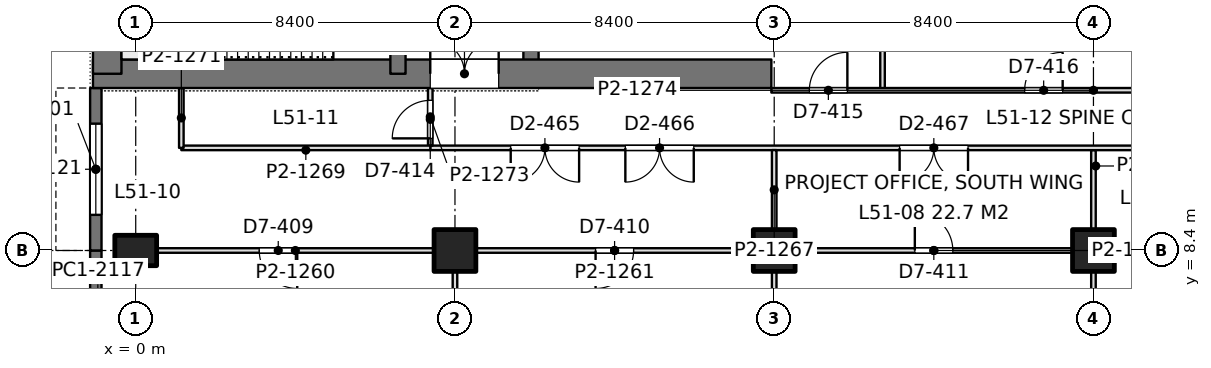
"""IFC4 building model, lengths in metres.
Left out: names, types, materials, properties, quantities, classifications, styles, units other than length and angle.
Written with IfcOpenShell. Run it as: python <this file> out.ifc"""

import sys

from ifc_helpers import new_model, si_unit, direction, frame, frame_2d, origin, origin_2d, place, context, subcontext, project, spatial, rectangle, extrude, element, fill, save


model = new_model("IFC4")
c1 = context("Model", 3, precision=1e-05, world=origin(), true_north=direction((0.0, 1.0)))
c2 = subcontext(c1, "Body", "Model", "MODEL_VIEW")
j1 = project(units=[si_unit("LENGTHUNIT", "METRE"), si_unit("PLANEANGLEUNIT", "RADIAN")], contexts=[c1])
p1 = place(None, origin())
s1 = spatial("IfcSite", under=j1, at=p1, CompositionType="ELEMENT")
p2 = place(p1, origin())
s2 = spatial("IfcBuilding", under=s1, at=p2, CompositionType="ELEMENT")
p3 = place(p2, frame((0.0, 0.0, 223.8)))
s3 = spatial("IfcBuildingStorey", under=s2, at=p3, CompositionType="ELEMENT", Elevation=223.8)
p4 = place(p3, frame((0.0, 8.4, 0.0), z_axis=(0.0, 0.0, 1.0), x_axis=(0.0, 1.0, 0.0)))
e1 = element("IfcColumn", 1, at=p4, inside=s3, PredefinedType="COLUMN", context=c2, shape_type="SweptSolid", body=[
    extrude(rectangle(XDim=0.8, YDim=1.1, at=origin_2d()), origin(), (0.0, 0.0, 1.0), 4.2),
])
for number, where, z_axis, x_axis in (
    (2, (8.4, 8.4, 0.0), (0.0, 0.0, 1.0), (1.0, 0.0, 0.0)),
    (3, (16.8, 8.4, 0.0), (0.0, 0.0, 1.0), (1.0, 0.0, 0.0)),
    (4, (25.2, 8.4, 0.0), (0.0, 0.0, 1.0), (1.0, 0.0, 0.0)),
):
    element("IfcColumn", number, at=place(p3, frame(where, z_axis=z_axis, x_axis=x_axis)), inside=s3, PredefinedType="COLUMN", context=c2, shape_type="SweptSolid", body=[
        extrude(rectangle(XDim=1.1, YDim=1.1, at=origin_2d()), origin(), (0.0, 0.0, 1.0), 4.2),
    ])
p5 = place(p3, frame((-1.125, 13.05, 0.0), z_axis=(0.0, 0.0, 1.0), x_axis=(1.0, 0.0, 0.0)))
e5 = element("IfcWall", 5, at=p5, inside=s3, PredefinedType="SHEAR", context=c2, shape_type="SweptSolid", body=[
    extrude(rectangle(XDim=17.85, YDim=0.75, at=frame_2d((8.925, 0.0))), origin(), (0.0, 0.0, 1.0), 4.2),
])
p6 = place(p5, frame((8.875, 0.0, 0.0)))
e6 = element("IfcOpeningElement", 6, at=p6, cuts=e5, PredefinedType="OPENING", context=c2, shape_type="SweptSolid", body=[
    extrude(rectangle(XDim=1.8, YDim=2.4, at=frame_2d((0.9, 1.2))), frame((0.0, 0.385, 0.0), z_axis=(0.0, -1.0, 0.0), x_axis=(1.0, 0.0, 0.0)), (0.0, 0.0, 1.0), 0.77),
])
p7 = place(p3, frame((-0.75, 13.05, 0.0), z_axis=(0.0, 0.0, 1.0), x_axis=(0.0, 1.0, 0.0)))
e7 = element("IfcWall", 7, at=p7, inside=s3, PredefinedType="SHEAR", context=c2, shape_type="SweptSolid", body=[
    extrude(rectangle(XDim=24.3, YDim=0.75, at=frame_2d((12.15, 0.0))), origin(), (0.0, 0.0, 1.0), 4.2),
])
p8 = place(p3, frame((6.9, 13.05, 0.0), z_axis=(0.0, 0.0, 1.0), x_axis=(0.0, 1.0, 0.0)))
e8 = element("IfcWall", 8, at=p8, inside=s3, PredefinedType="SHEAR", context=c2, shape_type="SweptSolid", body=[
    extrude(rectangle(XDim=24.3, YDim=0.4, at=frame_2d((12.15, 0.0))), origin(), (0.0, 0.0, 1.0), 4.2),
])
p9 = place(p8, frame((1.3, 0.0, 0.0)))
e9 = element("IfcOpeningElement", 9, at=p9, cuts=e8, PredefinedType="OPENING", context=c2, shape_type="SweptSolid", body=[
    extrude(rectangle(XDim=1.0, YDim=2.2, at=frame_2d((0.5, 1.1))), frame((0.0, 0.21, 0.0), z_axis=(0.0, -1.0, 0.0), x_axis=(1.0, 0.0, 0.0)), (0.0, 0.0, 1.0), 0.42),
])
p10 = place(p8, frame((22.0, 0.0, 0.0)))
e10 = element("IfcOpeningElement", 10, at=p10, cuts=e8, PredefinedType="OPENING", context=c2, shape_type="SweptSolid", body=[
    extrude(rectangle(XDim=1.0, YDim=2.2, at=frame_2d((0.5, 1.1))), frame((0.0, 0.21, 0.0), z_axis=(0.0, -1.0, 0.0), x_axis=(1.0, 0.0, 0.0)), (0.0, 0.0, 1.0), 0.42),
])
p11 = place(p8, frame((5.55, 0.0, 0.0)))
e11 = element("IfcOpeningElement", 11, at=p11, cuts=e8, PredefinedType="OPENING", context=c2, shape_type="SweptSolid", body=[
    extrude(rectangle(XDim=1.0, YDim=2.2, at=frame_2d((0.5, 1.1))), frame((0.0, 0.21, 0.0), z_axis=(0.0, -1.0, 0.0), x_axis=(1.0, 0.0, 0.0)), (0.0, 0.0, 1.0), 0.42),
])
p12 = place(p8, frame((9.55, 0.0, 0.0)))
e12 = element("IfcOpeningElement", 12, at=p12, cuts=e8, PredefinedType="OPENING", context=c2, shape_type="SweptSolid", body=[
    extrude(rectangle(XDim=1.0, YDim=2.2, at=frame_2d((0.5, 1.1))), frame((0.0, 0.21, 0.0), z_axis=(0.0, -1.0, 0.0), x_axis=(1.0, 0.0, 0.0)), (0.0, 0.0, 1.0), 0.42),
])
p13 = place(p8, frame((12.8, 0.0, 0.0)))
e13 = element("IfcOpeningElement", 13, at=p13, cuts=e8, PredefinedType="OPENING", context=c2, shape_type="SweptSolid", body=[
    extrude(rectangle(XDim=1.1, YDim=2.2, at=frame_2d((0.55, 1.1))), frame((0.0, 0.21, 0.0), z_axis=(0.0, -1.0, 0.0), x_axis=(1.0, 0.0, 0.0)), (0.0, 0.0, 1.0), 0.42),
])
p14 = place(p8, frame((15.538, 0.0, 0.0)))
e14 = element("IfcOpeningElement", 14, at=p14, cuts=e8, PredefinedType="OPENING", context=c2, shape_type="SweptSolid", body=[
    extrude(rectangle(XDim=1.1, YDim=2.2, at=frame_2d((0.55, 1.1))), frame((0.0, 0.21, 0.0), z_axis=(0.0, -1.0, 0.0), x_axis=(1.0, 0.0, 0.0)), (0.0, 0.0, 1.0), 0.42),
])
p15 = place(p8, frame((18.262, 0.0, 0.0)))
e15 = element("IfcOpeningElement", 15, at=p15, cuts=e8, PredefinedType="OPENING", context=c2, shape_type="SweptSolid", body=[
    extrude(rectangle(XDim=1.1, YDim=2.2, at=frame_2d((0.55, 1.1))), frame((0.0, 0.21, 0.0), z_axis=(0.0, -1.0, 0.0), x_axis=(1.0, 0.0, 0.0)), (0.0, 0.0, 1.0), 0.42),
])
p16 = place(p3, frame((10.4, 13.05, 0.0), z_axis=(0.0, 0.0, 1.0), x_axis=(0.0, 1.0, 0.0)))
e16 = element("IfcWall", 16, at=p16, inside=s3, PredefinedType="SHEAR", context=c2, shape_type="SweptSolid", body=[
    extrude(rectangle(XDim=24.3, YDim=0.4, at=frame_2d((12.15, 0.0))), origin(), (0.0, 0.0, 1.0), 4.2),
])
p17 = place(p16, frame((15.75, 0.0, 0.0)))
e17 = element("IfcOpeningElement", 17, at=p17, cuts=e16, PredefinedType="OPENING", context=c2, shape_type="SweptSolid", body=[
    extrude(rectangle(XDim=1.1, YDim=2.2, at=frame_2d((0.55, 1.1))), frame((0.0, 0.21, 0.0), z_axis=(0.0, -1.0, 0.0), x_axis=(1.0, 0.0, 0.0)), (0.0, 0.0, 1.0), 0.42),
])
p18 = place(p16, frame((18.6, 0.0, 0.0)))
e18 = element("IfcOpeningElement", 18, at=p18, cuts=e16, PredefinedType="OPENING", context=c2, shape_type="SweptSolid", body=[
    extrude(rectangle(XDim=1.1, YDim=2.2, at=frame_2d((0.55, 1.1))), frame((0.0, 0.21, 0.0), z_axis=(0.0, -1.0, 0.0), x_axis=(1.0, 0.0, 0.0)), (0.0, 0.0, 1.0), 0.42),
])
p19 = place(p16, frame((21.45, 0.0, 0.0)))
e19 = element("IfcOpeningElement", 19, at=p19, cuts=e16, PredefinedType="OPENING", context=c2, shape_type="SweptSolid", body=[
    extrude(rectangle(XDim=1.1, YDim=2.2, at=frame_2d((0.55, 1.1))), frame((0.0, 0.21, 0.0), z_axis=(0.0, -1.0, 0.0), x_axis=(1.0, 0.0, 0.0)), (0.0, 0.0, 1.0), 0.42),
])
p20 = place(p16, frame((6.05, 0.0, 0.0)))
e20 = element("IfcOpeningElement", 20, at=p20, cuts=e16, PredefinedType="OPENING", context=c2, shape_type="SweptSolid", body=[
    extrude(rectangle(XDim=1.8, YDim=2.4, at=frame_2d((0.9, 1.2))), frame((0.0, 0.21, 0.0), z_axis=(0.0, -1.0, 0.0), x_axis=(1.0, 0.0, 0.0)), (0.0, 0.0, 1.0), 0.42),
])
p21 = place(p16, frame((11.25, 0.0, 0.0)))
e21 = element("IfcOpeningElement", 21, at=p21, cuts=e16, PredefinedType="OPENING", context=c2, shape_type="SweptSolid", body=[
    extrude(rectangle(XDim=1.8, YDim=2.4, at=frame_2d((0.9, 1.2))), frame((0.0, 0.21, 0.0), z_axis=(0.0, -1.0, 0.0), x_axis=(1.0, 0.0, 0.0)), (0.0, 0.0, 1.0), 0.42),
])
p22 = place(p3, frame((-1.05, 5.915, 0.0), z_axis=(0.0, 0.0, 1.0), x_axis=(0.0, 1.0, 0.0)))
e22 = element("IfcWall", 22, at=p22, inside=s3, PredefinedType="SOLIDWALL", context=c2, shape_type="SweptSolid", body=[
    extrude(rectangle(XDim=2.485, YDim=0.3, at=frame_2d((1.243, 0.0))), origin(), (0.0, 0.0, 1.0), 4.05),
])
p23 = place(p3, frame((-1.05, 8.4, 0.0), z_axis=(0.0, 0.0, 1.0), x_axis=(0.0, 1.0, 0.0)))
e23 = element("IfcWall", 23, at=p23, inside=s3, PredefinedType="SOLIDWALL", context=c2, shape_type="SweptSolid", body=[
    extrude(rectangle(XDim=4.275, YDim=0.3, at=frame_2d((2.138, 0.0))), origin(), (0.0, 0.0, 1.0), 4.05),
])
p24 = place(p23, frame((0.938, 0.0, 0.9)))
e24 = element("IfcOpeningElement", 24, at=p24, cuts=e23, PredefinedType="OPENING", context=c2, shape_type="SweptSolid", body=[
    extrude(rectangle(XDim=2.4, YDim=1.9, at=frame_2d((1.2, 0.95))), frame((0.0, 0.16, 0.0), z_axis=(0.0, -1.0, 0.0), x_axis=(1.0, 0.0, 0.0)), (0.0, 0.0, 1.0), 0.32),
])
p25 = place(p3, frame((0.549, 8.4, 0.0), z_axis=(0.0, 0.0, 1.0), x_axis=(1.0, 0.0, 0.0)))
e25 = element("IfcWall", 25, at=p25, inside=s3, PredefinedType="PARTITIONING", context=c2, shape_type="SweptSolid", body=[
    extrude(rectangle(XDim=7.302, YDim=0.12, at=frame_2d((3.651, 0.0))), origin(), (0.0, 0.0, 1.0), 3.55),
])
p26 = place(p25, frame((2.701, 0.0, 0.0)))
e26 = element("IfcOpeningElement", 26, at=p26, cuts=e25, PredefinedType="OPENING", context=c2, shape_type="SweptSolid", body=[
    extrude(rectangle(XDim=1.0, YDim=2.4, at=frame_2d((0.5, 1.2))), frame((0.0, 0.07, 0.0), z_axis=(0.0, -1.0, 0.0), x_axis=(1.0, 0.0, 0.0)), (0.0, 0.0, 1.0), 0.14),
])
p27 = place(p3, frame((8.949, 8.4, 0.0), z_axis=(0.0, 0.0, 1.0), x_axis=(1.0, 0.0, 0.0)))
e27 = element("IfcWall", 27, at=p27, inside=s3, PredefinedType="PARTITIONING", context=c2, shape_type="SweptSolid", body=[
    extrude(rectangle(XDim=7.302, YDim=0.12, at=frame_2d((3.651, 0.0))), origin(), (0.0, 0.0, 1.0), 3.55),
])
p28 = place(p27, frame((3.151, 0.0, 0.0)))
e28 = element("IfcOpeningElement", 28, at=p28, cuts=e27, PredefinedType="OPENING", context=c2, shape_type="SweptSolid", body=[
    extrude(rectangle(XDim=1.0, YDim=2.4, at=frame_2d((0.5, 1.2))), frame((0.0, 0.07, 0.0), z_axis=(0.0, -1.0, 0.0), x_axis=(1.0, 0.0, 0.0)), (0.0, 0.0, 1.0), 0.14),
])
p29 = place(p3, frame((17.349, 8.4, 0.0), z_axis=(0.0, 0.0, 1.0), x_axis=(1.0, 0.0, 0.0)))
e29 = element("IfcWall", 29, at=p29, inside=s3, PredefinedType="PARTITIONING", context=c2, shape_type="SweptSolid", body=[
    extrude(rectangle(XDim=7.302, YDim=0.12, at=frame_2d((3.651, 0.0))), origin(), (0.0, 0.0, 1.0), 3.55),
])
p30 = place(p29, frame((3.151, 0.0, 0.0)))
e30 = element("IfcOpeningElement", 30, at=p30, cuts=e29, PredefinedType="OPENING", context=c2, shape_type="SweptSolid", body=[
    extrude(rectangle(XDim=1.0, YDim=2.4, at=frame_2d((0.5, 1.2))), frame((0.0, 0.07, 0.0), z_axis=(0.0, -1.0, 0.0), x_axis=(1.0, 0.0, 0.0)), (0.0, 0.0, 1.0), 0.14),
])
p31 = place(p3, frame((25.749, 8.4, 0.0), z_axis=(0.0, 0.0, 1.0), x_axis=(1.0, 0.0, 0.0)))
e31 = element("IfcWall", 31, at=p31, inside=s3, PredefinedType="PARTITIONING", context=c2, shape_type="SweptSolid", body=[
    extrude(rectangle(XDim=7.302, YDim=0.12, at=frame_2d((3.651, 0.0))), origin(), (0.0, 0.0, 1.0), 3.55),
])
p32 = place(p31, frame((3.151, 0.0, 0.0)))
e32 = element("IfcOpeningElement", 32, at=p32, cuts=e31, PredefinedType="OPENING", context=c2, shape_type="SweptSolid", body=[
    extrude(rectangle(XDim=1.0, YDim=2.4, at=frame_2d((0.5, 1.2))), frame((0.0, 0.07, 0.0), z_axis=(0.0, -1.0, 0.0), x_axis=(1.0, 0.0, 0.0)), (0.0, 0.0, 1.0), 0.14),
])
for number, where, z_axis, x_axis in (
    (33, (8.4, 6.149, 0.0), (0.0, 0.0, 1.0), (0.0, 1.0, 0.0)),
    (34, (16.8, 6.149, 0.0), (0.0, 0.0, 1.0), (0.0, 1.0, 0.0)),
    (35, (25.2, 6.149, 0.0), (0.0, 0.0, 1.0), (0.0, 1.0, 0.0)),
):
    element("IfcWall", number, at=place(p3, frame(where, z_axis=z_axis, x_axis=x_axis)), inside=s3, PredefinedType="PARTITIONING", context=c2, shape_type="SweptSolid", body=[
        extrude(rectangle(XDim=1.702, YDim=0.12, at=frame_2d((0.851, 0.0))), origin(), (0.0, 0.0, 1.0), 3.69),
    ])
p33 = place(p3, frame((16.8, 8.949, 0.0), z_axis=(0.0, 0.0, 1.0), x_axis=(0.0, 1.0, 0.0)))
e36 = element("IfcWall", 36, at=p33, inside=s3, PredefinedType="PARTITIONING", context=c2, shape_type="SweptSolid", body=[
    extrude(rectangle(XDim=2.093, YDim=0.12, at=frame_2d((1.046, 0.0))), origin(), (0.0, 0.0, 1.0), 3.69),
])
p34 = place(p3, frame((25.2, 8.949, 0.0), z_axis=(0.0, 0.0, 1.0), x_axis=(0.0, 1.0, 0.0)))
e37 = element("IfcWall", 37, at=p34, inside=s3, PredefinedType="PARTITIONING", context=c2, shape_type="SweptSolid", body=[
    extrude(rectangle(XDim=2.093, YDim=0.12, at=frame_2d((1.046, 0.0))), origin(), (0.0, 0.0, 1.0), 3.55),
])
p35 = place(p3, frame((7.748, 11.1, 0.0), z_axis=(0.0, 0.0, 1.0), x_axis=(1.0, 0.0, 0.0)))
e38 = element("IfcWall", 38, at=p35, inside=s3, PredefinedType="PARTITIONING", context=c2, shape_type="SweptSolid", body=[
    extrude(rectangle(XDim=41.452, YDim=0.12, at=frame_2d((20.726, 0.0))), origin(), (0.0, 0.0, 1.0), 3.55),
])
p36 = place(p35, frame((2.119, 0.0, 0.0)))
e39 = element("IfcOpeningElement", 39, at=p36, cuts=e38, PredefinedType="OPENING", context=c2, shape_type="SweptSolid", body=[
    extrude(rectangle(XDim=1.8, YDim=2.2, at=frame_2d((0.9, 1.1))), frame((0.0, 0.07, 0.0), z_axis=(0.0, -1.0, 0.0), x_axis=(1.0, 0.0, 0.0)), (0.0, 0.0, 1.0), 0.14),
])
p37 = place(p35, frame((5.135, 0.0, 0.0)))
e40 = element("IfcOpeningElement", 40, at=p37, cuts=e38, PredefinedType="OPENING", context=c2, shape_type="SweptSolid", body=[
    extrude(rectangle(XDim=1.8, YDim=2.2, at=frame_2d((0.9, 1.1))), frame((0.0, 0.07, 0.0), z_axis=(0.0, -1.0, 0.0), x_axis=(1.0, 0.0, 0.0)), (0.0, 0.0, 1.0), 0.14),
])
p38 = place(p35, frame((12.352, 0.0, 0.0)))
e41 = element("IfcOpeningElement", 41, at=p38, cuts=e38, PredefinedType="OPENING", context=c2, shape_type="SweptSolid", body=[
    extrude(rectangle(XDim=1.8, YDim=2.2, at=frame_2d((0.9, 1.1))), frame((0.0, 0.07, 0.0), z_axis=(0.0, -1.0, 0.0), x_axis=(1.0, 0.0, 0.0)), (0.0, 0.0, 1.0), 0.14),
])
p39 = place(p35, frame((20.752, 0.0, 0.0)))
e42 = element("IfcOpeningElement", 42, at=p39, cuts=e38, PredefinedType="OPENING", context=c2, shape_type="SweptSolid", body=[
    extrude(rectangle(XDim=1.8, YDim=2.2, at=frame_2d((0.9, 1.1))), frame((0.0, 0.07, 0.0), z_axis=(0.0, -1.0, 0.0), x_axis=(1.0, 0.0, 0.0)), (0.0, 0.0, 1.0), 0.14),
])
p40 = place(p35, frame((24.952, 0.0, 0.0)))
e43 = element("IfcOpeningElement", 43, at=p40, cuts=e38, PredefinedType="OPENING", context=c2, shape_type="SweptSolid", body=[
    extrude(rectangle(XDim=1.8, YDim=2.2, at=frame_2d((0.9, 1.1))), frame((0.0, 0.07, 0.0), z_axis=(0.0, -1.0, 0.0), x_axis=(1.0, 0.0, 0.0)), (0.0, 0.0, 1.0), 0.14),
])
p41 = place(p35, frame((32.952, 0.0, 0.0)))
e44 = element("IfcOpeningElement", 44, at=p41, cuts=e38, PredefinedType="OPENING", context=c2, shape_type="SweptSolid", body=[
    extrude(rectangle(XDim=1.8, YDim=2.2, at=frame_2d((0.9, 1.1))), frame((0.0, 0.07, 0.0), z_axis=(0.0, -1.0, 0.0), x_axis=(1.0, 0.0, 0.0)), (0.0, 0.0, 1.0), 0.14),
])
p42 = place(p35, frame((36.752, 0.0, 0.0)))
e45 = element("IfcOpeningElement", 45, at=p42, cuts=e38, PredefinedType="OPENING", context=c2, shape_type="SweptSolid", body=[
    extrude(rectangle(XDim=1.8, YDim=2.2, at=frame_2d((0.9, 1.1))), frame((0.0, 0.07, 0.0), z_axis=(0.0, -1.0, 0.0), x_axis=(1.0, 0.0, 0.0)), (0.0, 0.0, 1.0), 0.14),
])
p43 = place(p3, frame((7.75, 11.158, 0.0), z_axis=(0.0, 0.0, 1.0), x_axis=(0.0, 1.0, 0.0)))
e46 = element("IfcWall", 46, at=p43, inside=s3, PredefinedType="PARTITIONING", context=c2, shape_type="SweptSolid", body=[
    extrude(rectangle(XDim=1.518, YDim=0.12, at=frame_2d((0.759, 0.0))), origin(), (0.0, 0.0, 1.0), 4.05),
])
p44 = place(p43, frame((0.192, 0.0, 0.0)))
e47 = element("IfcOpeningElement", 47, at=p44, cuts=e46, PredefinedType="OPENING", context=c2, shape_type="SweptSolid", body=[
    extrude(rectangle(XDim=1.0, YDim=2.4, at=frame_2d((0.5, 1.2))), frame((0.0, 0.07, 0.0), z_axis=(0.0, -1.0, 0.0), x_axis=(1.0, 0.0, 0.0)), (0.0, 0.0, 1.0), 0.14),
])
p45 = place(p3, frame((1.2, 11.1, 0.0), z_axis=(0.0, 0.0, 1.0), x_axis=(1.0, 0.0, 0.0)))
e48 = element("IfcWall", 48, at=p45, inside=s3, PredefinedType="PARTITIONING", context=c2, shape_type="SweptSolid", body=[
    extrude(rectangle(XDim=6.552, YDim=0.12, at=frame_2d((3.276, 0.0))), origin(), (0.0, 0.0, 1.0), 4.05),
])
p46 = place(p3, frame((1.2, 11.1, 0.0), z_axis=(0.0, 0.0, 1.0), x_axis=(0.0, 1.0, 0.0)))
e49 = element("IfcWall", 49, at=p46, inside=s3, PredefinedType="PARTITIONING", context=c2, shape_type="SweptSolid", body=[
    extrude(rectangle(XDim=1.576, YDim=0.12, at=frame_2d((0.788, 0.0))), origin(), (0.0, 0.0, 1.0), 4.05),
])
p47 = place(p3, frame((19.65, 12.658, 0.0), z_axis=(0.0, 0.0, 1.0), x_axis=(0.0, 1.0, 0.0)))
e50 = element("IfcWall", 50, at=p47, inside=s3, PredefinedType="PARTITIONING", context=c2, shape_type="SweptSolid", body=[
    extrude(rectangle(XDim=4.444, YDim=0.12, at=frame_2d((2.222, 0.0))), origin(), (0.0, 0.0, 1.0), 3.36),
])
p48 = place(p3, frame((16.725, 12.615, 0.0), z_axis=(0.0, 0.0, 1.0), x_axis=(1.0, 0.0, 0.0)))
e51 = element("IfcWall", 51, at=p48, inside=s3, PredefinedType="PARTITIONING", context=c2, shape_type="SweptSolid", body=[
    extrude(rectangle(XDim=16.95, YDim=0.12, at=frame_2d((8.475, 0.0))), origin(), (0.0, 0.0, 1.0), 3.55),
])
p49 = place(p48, frame((1.0, 0.0, 0.0)))
e52 = element("IfcOpeningElement", 52, at=p49, cuts=e51, PredefinedType="OPENING", context=c2, shape_type="SweptSolid", body=[
    extrude(rectangle(XDim=1.0, YDim=2.4, at=frame_2d((0.5, 1.2))), frame((0.0, 0.07, 0.0), z_axis=(0.0, -1.0, 0.0), x_axis=(1.0, 0.0, 0.0)), (0.0, 0.0, 1.0), 0.14),
])
p50 = place(p48, frame((6.665, 0.0, 0.0)))
e53 = element("IfcOpeningElement", 53, at=p50, cuts=e51, PredefinedType="OPENING", context=c2, shape_type="SweptSolid", body=[
    extrude(rectangle(XDim=1.0, YDim=2.4, at=frame_2d((0.5, 1.2))), frame((0.0, 0.07, 0.0), z_axis=(0.0, -1.0, 0.0), x_axis=(1.0, 0.0, 0.0)), (0.0, 0.0, 1.0), 0.14),
])
p51 = place(p48, frame((13.64, 0.0, 0.0)))
e54 = element("IfcOpeningElement", 54, at=p51, cuts=e51, PredefinedType="OPENING", context=c2, shape_type="SweptSolid", body=[
    extrude(rectangle(XDim=1.0, YDim=2.4, at=frame_2d((0.5, 1.2))), frame((0.0, 0.07, 0.0), z_axis=(0.0, -1.0, 0.0), x_axis=(1.0, 0.0, 0.0)), (0.0, 0.0, 1.0), 0.14),
])
p52 = place(p24, origin())
e55 = element("IfcWindow", 55, at=p52, inside=s3, PartitioningType="SINGLE_PANEL", PredefinedType="WINDOW", context=c2, shape_type="SweptSolid", body=[
    extrude(rectangle(XDim=2.4, YDim=1.9, at=frame_2d((1.2, 0.95))), frame((0.0, 0.03, 0.0), z_axis=(0.0, -1.0, 0.0), x_axis=(1.0, 0.0, 0.0)), (0.0, 0.0, 1.0), 0.06),
])
fill(e24, e55)
p53 = place(p6, origin())
e56 = element("IfcDoor", 56, at=p53, inside=s3, OperationType="DOUBLE_DOOR_SINGLE_SWING", PredefinedType="DOOR", context=c2, shape_type="SweptSolid", body=[
    extrude(rectangle(XDim=1.8, YDim=2.4, at=frame_2d((0.9, 1.2))), frame((0.0, 0.025, 0.0), z_axis=(0.0, -1.0, 0.0), x_axis=(1.0, 0.0, 0.0)), (0.0, 0.0, 1.0), 0.05),
])
fill(e6, e56)
p54 = place(p26, frame((1.0, 0.0, 0.0), z_axis=(0.0, 0.0, 1.0), x_axis=(-1.0, 0.0, 0.0)))
e57 = element("IfcDoor", 57, at=p54, inside=s3, OperationType="SINGLE_SWING_LEFT", PredefinedType="DOOR", context=c2, shape_type="SweptSolid", body=[
    extrude(rectangle(XDim=1.0, YDim=2.4, at=frame_2d((0.5, 1.2))), frame((0.0, 0.025, 0.0), z_axis=(0.0, -1.0, 0.0), x_axis=(1.0, 0.0, 0.0)), (0.0, 0.0, 1.0), 0.05),
])
fill(e26, e57)
p55 = place(p28, frame((1.0, 0.0, 0.0), z_axis=(0.0, 0.0, 1.0), x_axis=(-1.0, 0.0, 0.0)))
e58 = element("IfcDoor", 58, at=p55, inside=s3, OperationType="SINGLE_SWING_RIGHT", PredefinedType="DOOR", context=c2, shape_type="SweptSolid", body=[
    extrude(rectangle(XDim=1.0, YDim=2.4, at=frame_2d((0.5, 1.2))), frame((0.0, 0.025, 0.0), z_axis=(0.0, -1.0, 0.0), x_axis=(1.0, 0.0, 0.0)), (0.0, 0.0, 1.0), 0.05),
])
fill(e28, e58)
p56 = place(p30, origin())
e59 = element("IfcDoor", 59, at=p56, inside=s3, OperationType="SINGLE_SWING_LEFT", PredefinedType="DOOR", context=c2, shape_type="SweptSolid", body=[
    extrude(rectangle(XDim=1.0, YDim=2.4, at=frame_2d((0.5, 1.2))), frame((0.0, 0.025, 0.0), z_axis=(0.0, -1.0, 0.0), x_axis=(1.0, 0.0, 0.0)), (0.0, 0.0, 1.0), 0.05),
])
fill(e30, e59)
p57 = place(p36, frame((1.8, 0.0, 0.0), z_axis=(0.0, 0.0, 1.0), x_axis=(-1.0, 0.0, 0.0)))
e60 = element("IfcDoor", 60, at=p57, inside=s3, OperationType="DOUBLE_DOOR_SINGLE_SWING", PredefinedType="DOOR", context=c2, shape_type="SweptSolid", body=[
    extrude(rectangle(XDim=1.8, YDim=2.2, at=frame_2d((0.9, 1.1))), frame((0.0, 0.025, 0.0), z_axis=(0.0, -1.0, 0.0), x_axis=(1.0, 0.0, 0.0)), (0.0, 0.0, 1.0), 0.05),
])
fill(e39, e60)
p58 = place(p37, frame((1.8, 0.0, 0.0), z_axis=(0.0, 0.0, 1.0), x_axis=(-1.0, 0.0, 0.0)))
e61 = element("IfcDoor", 61, at=p58, inside=s3, OperationType="DOUBLE_DOOR_SINGLE_SWING", PredefinedType="DOOR", context=c2, shape_type="SweptSolid", body=[
    extrude(rectangle(XDim=1.8, YDim=2.2, at=frame_2d((0.9, 1.1))), frame((0.0, 0.025, 0.0), z_axis=(0.0, -1.0, 0.0), x_axis=(1.0, 0.0, 0.0)), (0.0, 0.0, 1.0), 0.05),
])
fill(e40, e61)
p59 = place(p38, frame((1.8, 0.0, 0.0), z_axis=(0.0, 0.0, 1.0), x_axis=(-1.0, 0.0, 0.0)))
e62 = element("IfcDoor", 62, at=p59, inside=s3, OperationType="DOUBLE_DOOR_SINGLE_SWING", PredefinedType="DOOR", context=c2, shape_type="SweptSolid", body=[
    extrude(rectangle(XDim=1.8, YDim=2.2, at=frame_2d((0.9, 1.1))), frame((0.0, 0.025, 0.0), z_axis=(0.0, -1.0, 0.0), x_axis=(1.0, 0.0, 0.0)), (0.0, 0.0, 1.0), 0.05),
])
fill(e41, e62)
p60 = place(p44, origin())
e63 = element("IfcDoor", 63, at=p60, inside=s3, OperationType="SINGLE_SWING_LEFT", PredefinedType="DOOR", context=c2, shape_type="SweptSolid", body=[
    extrude(rectangle(XDim=1.0, YDim=2.4, at=frame_2d((0.5, 1.2))), frame((0.0, 0.025, 0.0), z_axis=(0.0, -1.0, 0.0), x_axis=(1.0, 0.0, 0.0)), (0.0, 0.0, 1.0), 0.05),
])
fill(e47, e63)
p61 = place(p49, origin())
e64 = element("IfcDoor", 64, at=p61, inside=s3, OperationType="SINGLE_SWING_RIGHT", PredefinedType="DOOR", context=c2, shape_type="SweptSolid", body=[
    extrude(rectangle(XDim=1.0, YDim=2.4, at=frame_2d((0.5, 1.2))), frame((0.0, 0.025, 0.0), z_axis=(0.0, -1.0, 0.0), x_axis=(1.0, 0.0, 0.0)), (0.0, 0.0, 1.0), 0.05),
])
fill(e52, e64)
p62 = place(p50, origin())
e65 = element("IfcDoor", 65, at=p62, inside=s3, OperationType="SINGLE_SWING_RIGHT", PredefinedType="DOOR", context=c2, shape_type="SweptSolid", body=[
    extrude(rectangle(XDim=1.0, YDim=2.4, at=frame_2d((0.5, 1.2))), frame((0.0, 0.025, 0.0), z_axis=(0.0, -1.0, 0.0), x_axis=(1.0, 0.0, 0.0)), (0.0, 0.0, 1.0), 0.05),
])
fill(e53, e65)
save(model, sys.argv[1])
